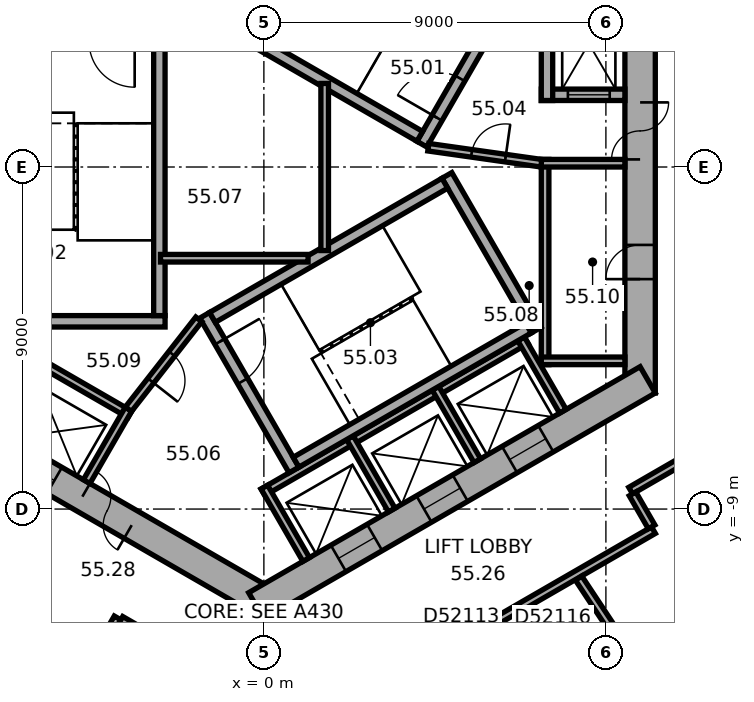
"""IFC4 building model, lengths in metres.
Left out: names, types, materials, properties, quantities, classifications, styles, units other than length and angle.
Written with IfcOpenShell. Run it as: python <this file> out.ifc"""

import sys

from ifc_helpers import new_model, si_unit, direction, frame, frame_2d, origin, place, context, subcontext, project, spatial, rectangle, extrude, element, fill, save


model = new_model("IFC4")
c1 = context("Model", 3, precision=1e-05, world=origin(), true_north=direction((0.0, 1.0)))
c2 = subcontext(c1, "Body", "Model", "MODEL_VIEW")
j1 = project(units=[si_unit("LENGTHUNIT", "METRE"), si_unit("PLANEANGLEUNIT", "RADIAN")], contexts=[c1])
p1 = place(None, origin())
s1 = spatial("IfcSite", under=j1, at=p1, CompositionType="ELEMENT")
p2 = place(p1, origin())
s2 = spatial("IfcBuilding", under=s1, at=p2, CompositionType="ELEMENT")
p3 = place(p2, frame((0.0, 0.0, 225.4)))
s3 = spatial("IfcBuildingStorey", under=s2, at=p3, CompositionType="ELEMENT", Elevation=225.4)
p4 = place(p3, frame((9.9, -5.947, 0.0), z_axis=(0.0, 0.0, 1.0), x_axis=(0.0, 1.0, 0.0)))
e1 = element("IfcWall", 1, at=p4, inside=s3, PredefinedType="SHEAR", context=c2, shape_type="SweptSolid", body=[
    extrude(rectangle(XDim=11.894, YDim=0.8, at=frame_2d((5.947, 0.0))), origin(), (0.0, 0.0, 1.0), 3.7),
])
p5 = place(p4, frame((6.147, 0.0, 0.0)))
e2 = element("IfcOpeningElement", 2, at=p5, cuts=e1, PredefinedType="OPENING", context=c2, shape_type="SweptSolid", body=[
    extrude(rectangle(XDim=1.5, YDim=2.1, at=frame_2d((0.75, 1.05))), frame((0.0, 0.41, 0.0), z_axis=(0.0, -1.0, 0.0), x_axis=(1.0, 0.0, 0.0)), (0.0, 0.0, 1.0), 0.82),
])
p6 = place(p4, frame((2.997, 0.0, 0.0)))
e3 = element("IfcOpeningElement", 3, at=p6, cuts=e1, PredefinedType="OPENING", context=c2, shape_type="SweptSolid", body=[
    extrude(rectangle(XDim=0.9, YDim=2.1, at=frame_2d((0.45, 1.05))), frame((0.0, 0.41, 0.0), z_axis=(0.0, -1.0, 0.0), x_axis=(1.0, 0.0, 0.0)), (0.0, 0.0, 1.0), 0.82),
])
p7 = place(p3, frame((-10.1, -5.6, 0.0), z_axis=(0.0, 0.0, 1.0), x_axis=(0.866023897231, -0.500002609418, 0.0)))
e4 = element("IfcWall", 4, at=p7, inside=s3, PredefinedType="SHEAR", context=c2, shape_type="SweptSolid", body=[
    extrude(rectangle(XDim=11.894, YDim=0.8, at=frame_2d((5.947, 0.0))), origin(), (0.0, 0.0, 1.0), 3.7),
])
p8 = place(p7, frame((6.147, 0.0, 0.0)))
e5 = element("IfcOpeningElement", 5, at=p8, cuts=e4, PredefinedType="OPENING", context=c2, shape_type="SweptSolid", body=[
    extrude(rectangle(XDim=1.5, YDim=2.1, at=frame_2d((0.75, 1.05))), frame((0.0, 0.41, 0.0), z_axis=(0.0, -1.0, 0.0), x_axis=(1.0, 0.0, 0.0)), (0.0, 0.0, 1.0), 0.82),
])
p9 = place(p7, frame((1.597, 0.0, 0.0)))
e6 = element("IfcOpeningElement", 6, at=p9, cuts=e4, PredefinedType="OPENING", context=c2, shape_type="SweptSolid", body=[
    extrude(rectangle(XDim=1.1, YDim=2.1, at=frame_2d((0.55, 1.05))), frame((0.0, 0.41, 0.0), z_axis=(0.0, -1.0, 0.0), x_axis=(1.0, 0.0, 0.0)), (0.0, 0.0, 1.0), 0.82),
])
p10 = place(p7, frame((4.197, 0.0, 0.0)))
e7 = element("IfcOpeningElement", 7, at=p10, cuts=e4, PredefinedType="OPENING", context=c2, shape_type="SweptSolid", body=[
    extrude(rectangle(XDim=1.1, YDim=2.1, at=frame_2d((0.55, 1.05))), frame((0.0, 0.41, 0.0), z_axis=(0.0, -1.0, 0.0), x_axis=(1.0, 0.0, 0.0)), (0.0, 0.0, 1.0), 0.82),
])
p11 = place(p3, frame((-0.2, -11.547, 0.0), z_axis=(0.0, 0.0, 1.0), x_axis=(0.866023897231, 0.500002609418, 0.0)))
e8 = element("IfcWall", 8, at=p11, inside=s3, PredefinedType="SHEAR", context=c2, shape_type="SweptSolid", body=[
    extrude(rectangle(XDim=11.894, YDim=0.8, at=frame_2d((5.947, 0.0))), origin(), (0.0, 0.0, 1.0), 3.7),
])
p12 = place(p11, frame((2.497, 0.0, 0.0)))
e9 = element("IfcOpeningElement", 9, at=p12, cuts=e8, PredefinedType="OPENING", context=c2, shape_type="SweptSolid", body=[
    extrude(rectangle(XDim=1.1, YDim=2.1, at=frame_2d((0.55, 1.05))), frame((0.0, 0.41, 0.0), z_axis=(0.0, -1.0, 0.0), x_axis=(1.0, 0.0, 0.0)), (0.0, 0.0, 1.0), 0.82),
])
p13 = place(p11, frame((5.097, 0.0, 0.0)))
e10 = element("IfcOpeningElement", 10, at=p13, cuts=e8, PredefinedType="OPENING", context=c2, shape_type="SweptSolid", body=[
    extrude(rectangle(XDim=1.1, YDim=2.1, at=frame_2d((0.55, 1.05))), frame((0.0, 0.41, 0.0), z_axis=(0.0, -1.0, 0.0), x_axis=(1.0, 0.0, 0.0)), (0.0, 0.0, 1.0), 0.82),
])
p14 = place(p11, frame((7.697, 0.0, 0.0)))
e11 = element("IfcOpeningElement", 11, at=p14, cuts=e8, PredefinedType="OPENING", context=c2, shape_type="SweptSolid", body=[
    extrude(rectangle(XDim=1.1, YDim=2.1, at=frame_2d((0.55, 1.05))), frame((0.0, 0.41, 0.0), z_axis=(0.0, -1.0, 0.0), x_axis=(1.0, 0.0, 0.0)), (0.0, 0.0, 1.0), 0.82),
])
p15 = place(p3, frame((7.4, -5.2, 0.0), z_axis=(0.0, 0.0, 1.0), x_axis=(0.0, 1.0, 0.0)))
e12 = element("IfcWall", 12, at=p15, inside=s3, PredefinedType="PARTITIONING", context=c2, shape_type="SweptSolid", body=[
    extrude(rectangle(XDim=5.4, YDim=0.2, at=frame_2d((2.7, 0.0))), origin(), (0.0, 0.0, 1.0), 3.42),
])
for number, where, z_axis, x_axis in (
    (13, (7.3, -5.1, 0.0), (0.0, 0.0, 1.0), (1.0, 0.0, 0.0)),
    (14, (7.3, 0.1, 0.0), (0.0, 0.0, 1.0), (1.0, 0.0, 0.0)),
):
    element("IfcWall", number, at=place(p3, frame(where, z_axis=z_axis, x_axis=x_axis)), inside=s3, PredefinedType="PARTITIONING", context=c2, shape_type="SweptSolid", body=[
        extrude(rectangle(XDim=2.2, YDim=0.2, at=frame_2d((1.1, 0.0))), origin(), (0.0, 0.0, 1.0), 3.42),
    ])
p16 = place(p3, frame((-8.203, -3.809, 0.0), z_axis=(0.0, 0.0, 1.0), x_axis=(0.866028230842, -0.499995103361, 0.0)))
e15 = element("IfcWall", 15, at=p16, inside=s3, PredefinedType="PARTITIONING", context=c2, shape_type="SweptSolid", body=[
    extrude(rectangle(XDim=5.4, YDim=0.2, at=frame_2d((2.7, 0.0))), origin(), (0.0, 0.0, 1.0), 3.42),
])
p17 = place(p3, frame((-3.563, -6.372, 0.0), z_axis=(0.0, 0.0, 1.0), x_axis=(-0.499994660107, -0.866028486751, 0.0)))
e16 = element("IfcWall", 16, at=p17, inside=s3, PredefinedType="PARTITIONING", context=c2, shape_type="SweptSolid", body=[
    extrude(rectangle(XDim=2.2, YDim=0.2, at=frame_2d((1.1, 0.0))), origin(), (0.0, 0.0, 1.0), 3.42),
])
p18 = place(p3, frame((-0.024, -8.559, 0.0), z_axis=(0.0, 0.0, 1.0), x_axis=(0.866026010844, 0.49999894854, 0.0)))
e17 = element("IfcWall", 17, at=p18, inside=s3, PredefinedType="PARTITIONING", context=c2, shape_type="SweptSolid", body=[
    extrude(rectangle(XDim=8.0, YDim=0.2, at=frame_2d((4.0, 0.0))), origin(), (0.0, 0.0, 1.0), 3.42),
])
for number, where, z_axis, x_axis in (
    (18, (0.013, -8.422, 0.0), (0.0, 0.0, 1.0), (0.5, -0.866, 0.0)),
    (19, (2.264, -7.122, 0.0), (0.0, 0.0, 1.0), (0.5, -0.866, 0.0)),
    (20, (4.516, -5.822, 0.0), (0.0, 0.0, 1.0), (0.5, -0.866, 0.0)),
    (21, (6.768, -4.522, 0.0), (0.0, 0.0, 1.0), (0.5, -0.866, 0.0)),
):
    element("IfcWall", number, at=place(p3, frame(where, z_axis=z_axis, x_axis=x_axis)), inside=s3, PredefinedType="PARTITIONING", context=c2, shape_type="SweptSolid", body=[
        extrude(rectangle(XDim=2.2, YDim=0.2, at=frame_2d((1.1, 0.0))), origin(), (0.0, 0.0, 1.0), 3.42),
    ])
p19 = place(p3, frame((4.158, 0.602, 0.0), z_axis=(0.0, 0.0, 1.0), x_axis=(0.499977259774, 0.866038532462, 0.0)))
e22 = element("IfcWall", 22, at=p19, inside=s3, PredefinedType="SHEAR", context=c2, shape_type="SweptSolid", body=[
    extrude(rectangle(XDim=4.7, YDim=0.3, at=frame_2d((2.35, 0.0))), origin(), (0.0, 0.0, 1.0), 3.42),
])
p20 = place(p19, frame((0.8, 0.0, 0.0)))
e23 = element("IfcOpeningElement", 23, at=p20, cuts=e22, PredefinedType="OPENING", context=c2, shape_type="SweptSolid", body=[
    extrude(rectangle(XDim=1.2, YDim=2.1, at=frame_2d((0.6, 1.05))), frame((0.0, 0.16, 0.0), z_axis=(0.0, -1.0, 0.0), x_axis=(1.0, 0.0, 0.0)), (0.0, 0.0, 1.0), 0.32),
])
p21 = place(p3, frame((4.103, 0.807, 0.0), z_axis=(0.0, 0.0, 1.0), x_axis=(-0.866027801685, 0.499995846692, 0.0)))
e24 = element("IfcWall", 24, at=p21, inside=s3, PredefinedType="SHEAR", context=c2, shape_type="SweptSolid", body=[
    extrude(rectangle(XDim=7.06, YDim=0.3, at=frame_2d((3.53, 0.0))), origin(), (0.0, 0.0, 1.0), 3.42),
])
p22 = place(p3, frame((-2.6, -4.06, 0.0), z_axis=(0.0, 0.0, 1.0), x_axis=(-1.0, 0.0, 0.0)))
e25 = element("IfcWall", 25, at=p22, inside=s3, PredefinedType="SHEAR", context=c2, shape_type="SweptSolid", body=[
    extrude(rectangle(XDim=4.7, YDim=0.3, at=frame_2d((2.35, 0.0))), origin(), (0.0, 0.0, 1.0), 3.42),
])
p23 = place(p3, frame((-2.75, 3.15, 0.0), z_axis=(0.0, 0.0, 1.0), x_axis=(0.0, -1.0, 0.0)))
e26 = element("IfcWall", 26, at=p23, inside=s3, PredefinedType="SHEAR", context=c2, shape_type="SweptSolid", body=[
    extrude(rectangle(XDim=7.06, YDim=0.3, at=frame_2d((3.53, 0.0))), origin(), (0.0, 0.0, 1.0), 3.42),
])
p24 = place(p3, frame((-1.558, -3.902, 0.0), z_axis=(0.0, 0.0, 1.0), x_axis=(0.499977259774, -0.866038532462, 0.0)))
e27 = element("IfcWall", 27, at=p24, inside=s3, PredefinedType="SHEAR", context=c2, shape_type="SweptSolid", body=[
    extrude(rectangle(XDim=4.7, YDim=0.3, at=frame_2d((2.35, 0.0))), origin(), (0.0, 0.0, 1.0), 3.42),
])
p25 = place(p24, frame((0.8, 0.0, 0.0)))
e28 = element("IfcOpeningElement", 28, at=p25, cuts=e27, PredefinedType="OPENING", context=c2, shape_type="SweptSolid", body=[
    extrude(rectangle(XDim=1.2, YDim=2.1, at=frame_2d((0.6, 1.05))), frame((0.0, 0.16, 0.0), z_axis=(0.0, -1.0, 0.0), x_axis=(1.0, 0.0, 0.0)), (0.0, 0.0, 1.0), 0.32),
])
p26 = place(p3, frame((4.816, -0.222, 0.0), z_axis=(0.0, 0.0, 1.0), x_axis=(0.499977259774, -0.866038532462, 0.0)))
e29 = element("IfcWall", 29, at=p26, inside=s3, PredefinedType="SHEAR", context=c2, shape_type="SweptSolid", body=[
    extrude(rectangle(XDim=4.7, YDim=0.3, at=frame_2d((2.35, 0.0))), origin(), (0.0, 0.0, 1.0), 3.42),
])
for number, where, z_axis, x_axis in (
    (30, (-1.353, -3.957, 0.0), (0.0, 0.0, 1.0), (0.866, 0.5, 0.0)),
    (31, (0.847, -7.767, 0.0), (0.0, 0.0, 1.0), (0.866, 0.5, 0.0)),
):
    element("IfcWall", number, at=place(p3, frame(where, z_axis=z_axis, x_axis=x_axis)), inside=s3, PredefinedType="SHEAR", context=c2, shape_type="SweptSolid", body=[
        extrude(rectangle(XDim=7.06, YDim=0.3, at=frame_2d((3.53, 0.0))), origin(), (0.0, 0.0, 1.0), 3.42),
    ])
p27 = place(p3, frame((7.3, 1.9, 0.0), z_axis=(0.0, 0.0, 1.0), x_axis=(1.0, 0.0, 0.0)))
e32 = element("IfcWall", 32, at=p27, inside=s3, PredefinedType="SHEAR", context=c2, shape_type="SweptSolid", body=[
    extrude(rectangle(XDim=2.2, YDim=0.3, at=frame_2d((1.1, 0.0))), origin(), (0.0, 0.0, 1.0), 3.42),
])
p28 = place(p27, frame((0.7, 0.0, 0.0)))
e33 = element("IfcOpeningElement", 33, at=p28, cuts=e32, PredefinedType="OPENING", context=c2, shape_type="SweptSolid", body=[
    extrude(rectangle(XDim=1.1, YDim=2.1, at=frame_2d((0.55, 1.05))), frame((0.0, 0.16, 0.0), z_axis=(0.0, -1.0, 0.0), x_axis=(1.0, 0.0, 0.0)), (0.0, 0.0, 1.0), 0.32),
])
p29 = place(p3, frame((7.45, 1.75, 0.0), z_axis=(0.0, 0.0, 1.0), x_axis=(0.0, 1.0, 0.0)))
e34 = element("IfcWall", 34, at=p29, inside=s3, PredefinedType="SHEAR", context=c2, shape_type="SweptSolid", body=[
    extrude(rectangle(XDim=3.35, YDim=0.3, at=frame_2d((1.675, 0.0))), origin(), (0.0, 0.0, 1.0), 3.42),
])
p30 = place(p3, frame((4.327, 0.521, 0.0), z_axis=(0.0, 0.0, 1.0), x_axis=(0.990124376366, -0.14019172346, 0.0)))
e35 = element("IfcWall", 35, at=p30, inside=s3, PredefinedType="PARTITIONING", context=c2, shape_type="SweptSolid", body=[
    extrude(rectangle(XDim=3.002, YDim=0.2, at=frame_2d((1.501, 0.0))), origin(), (0.0, 0.0, 1.0), 3.42),
])
p31 = place(p30, frame((1.15, 0.0, 0.0)))
e36 = element("IfcOpeningElement", 36, at=p31, cuts=e35, PredefinedType="OPENING", context=c2, shape_type="SweptSolid", body=[
    extrude(rectangle(XDim=0.9, YDim=2.1, at=frame_2d((0.45, 1.05))), frame((0.0, 0.11, 0.0), z_axis=(0.0, -1.0, 0.0), x_axis=(1.0, 0.0, 0.0)), (0.0, 0.0, 1.0), 0.22),
])
p32 = place(p3, frame((-1.712, -4.008, 0.0), z_axis=(0.0, 0.0, 1.0), x_axis=(-0.616549420702, -0.787316208287, 0.0)))
e37 = element("IfcWall", 37, at=p32, inside=s3, PredefinedType="PARTITIONING", context=c2, shape_type="SweptSolid", body=[
    extrude(rectangle(XDim=3.002, YDim=0.2, at=frame_2d((1.501, 0.0))), origin(), (0.0, 0.0, 1.0), 3.42),
])
p33 = place(p32, frame((1.15, 0.0, 0.0)))
e38 = element("IfcOpeningElement", 38, at=p33, cuts=e37, PredefinedType="OPENING", context=c2, shape_type="SweptSolid", body=[
    extrude(rectangle(XDim=0.9, YDim=2.1, at=frame_2d((0.45, 1.05))), frame((0.0, 0.11, 0.0), z_axis=(0.0, -1.0, 0.0), x_axis=(1.0, 0.0, 0.0)), (0.0, 0.0, 1.0), 0.22),
])
p34 = place(p3, frame((-2.72, -2.4, 0.0), z_axis=(0.0, 0.0, 1.0), x_axis=(1.0, 0.0, 0.0)))
e39 = element("IfcWall", 39, at=p34, inside=s3, PredefinedType="PARTITIONING", context=c2, shape_type="SweptSolid", body=[
    extrude(rectangle(XDim=3.883, YDim=0.2, at=frame_2d((1.941, 0.0))), origin(), (0.0, 0.0, 1.0), 3.42),
])
p35 = place(p3, frame((1.6, -2.198, 0.0), z_axis=(0.0, 0.0, 1.0), x_axis=(0.0, 1.0, 0.0)))
e40 = element("IfcWall", 40, at=p35, inside=s3, PredefinedType="PARTITIONING", context=c2, shape_type="SweptSolid", body=[
    extrude(rectangle(XDim=4.397, YDim=0.2, at=frame_2d((2.198, 0.0))), origin(), (0.0, 0.0, 1.0), 3.42),
])
p36 = place(p3, frame((-7.525, -18.23, 0.0), z_axis=(0.0, 0.0, 1.0), x_axis=(0.499983153418, 0.866035129944, 0.0)))
e41 = element("IfcWall", 41, at=p36, inside=s3, PredefinedType="PARTITIONING", context=c2, shape_type="SweptSolid", body=[
    extrude(rectangle(XDim=7.35, YDim=0.2, at=frame_2d((3.675, 0.0))), origin(), (0.0, 0.0, 1.0), 3.42),
])
p37 = place(p36, frame((3.175, 0.0, 0.0)))
e42 = element("IfcOpeningElement", 42, at=p37, cuts=e41, PredefinedType="OPENING", context=c2, shape_type="SweptSolid", body=[
    extrude(rectangle(XDim=1.0, YDim=2.1, at=frame_2d((0.5, 1.05))), frame((0.0, 0.11, 0.0), z_axis=(0.0, -1.0, 0.0), x_axis=(1.0, 0.0, 0.0)), (0.0, 0.0, 1.0), 0.22),
])
p38 = place(p3, frame((-3.763, -11.915, 0.0), z_axis=(0.0, 0.0, 1.0), x_axis=(0.866037915695, -0.499978328108, 0.0)))
e43 = element("IfcWall", 43, at=p38, inside=s3, PredefinedType="PARTITIONING", context=c2, shape_type="SweptSolid", body=[
    extrude(rectangle(XDim=3.249, YDim=0.2, at=frame_2d((1.625, 0.0))), origin(), (0.0, 0.0, 1.0), 3.42),
])
p39 = place(p3, frame((2.716, -13.906, 0.0), z_axis=(0.0, 0.0, 1.0), x_axis=(0.866040290674, 0.499974214264, 0.0)))
e44 = element("IfcWall", 44, at=p39, inside=s3, PredefinedType="PARTITIONING", context=c2, shape_type="SweptSolid", body=[
    extrude(rectangle(XDim=8.702, YDim=0.2, at=frame_2d((4.351, 0.0))), origin(), (0.0, 0.0, 1.0), 3.42),
])
p40 = place(p39, frame((2.679, 0.0, 0.0)))
e45 = element("IfcOpeningElement", 45, at=p40, cuts=e44, PredefinedType="OPENING", context=c2, shape_type="SweptSolid", body=[
    extrude(rectangle(XDim=1.0, YDim=2.1, at=frame_2d((0.5, 1.05))), frame((0.0, 0.11, 0.0), z_axis=(0.0, -1.0, 0.0), x_axis=(1.0, 0.0, 0.0)), (0.0, 0.0, 1.0), 0.22),
])
p41 = place(p3, frame((9.652, -8.515, 0.0), z_axis=(0.0, 0.0, 1.0), x_axis=(0.866020375458, 0.500008709215, 0.0)))
e46 = element("IfcWall", 46, at=p41, inside=s3, PredefinedType="PARTITIONING", context=c2, shape_type="SweptSolid", body=[
    extrude(rectangle(XDim=1.846, YDim=0.2, at=frame_2d((0.923, 0.0))), origin(), (0.0, 0.0, 1.0), 3.42),
])
p42 = place(p3, frame((10.202, -9.469, 0.0), z_axis=(0.0, 0.0, 1.0), x_axis=(-0.499968756647, 0.866043441391, 0.0)))
e47 = element("IfcWall", 47, at=p42, inside=s3, PredefinedType="PARTITIONING", context=c2, shape_type="SweptSolid", body=[
    extrude(rectangle(XDim=1.001, YDim=0.2, at=frame_2d((0.5, 0.0))), origin(), (0.0, 0.0, 1.0), 3.42),
])
p43 = place(p3, frame((11.571, -15.786, 0.0), z_axis=(0.0, 0.0, 1.0), x_axis=(-0.551944861763, 0.833880608705, 0.0)))
e48 = element("IfcWall", 48, at=p43, inside=s3, PredefinedType="PARTITIONING", context=c2, shape_type="SweptSolid", body=[
    extrude(rectangle(XDim=5.957, YDim=0.2, at=frame_2d((2.979, 0.0))), origin(), (0.0, 0.0, 1.0), 3.42),
])
p44 = place(p5, origin())
e49 = element("IfcDoor", 49, at=p44, inside=s3, OperationType="DOUBLE_DOOR_SINGLE_SWING", PredefinedType="DOOR", context=c2, shape_type="SweptSolid", body=[
    extrude(rectangle(XDim=1.5, YDim=2.1, at=frame_2d((0.75, 1.05))), frame((0.0, 0.025, 0.0), z_axis=(0.0, -1.0, 0.0), x_axis=(1.0, 0.0, 0.0)), (0.0, 0.0, 1.0), 0.05),
])
fill(e2, e49)
p45 = place(p8, origin())
e50 = element("IfcDoor", 50, at=p45, inside=s3, OperationType="DOUBLE_DOOR_SINGLE_SWING", PredefinedType="DOOR", context=c2, shape_type="SweptSolid", body=[
    extrude(rectangle(XDim=1.5, YDim=2.1, at=frame_2d((0.75, 1.05))), frame((0.0, 0.025, 0.0), z_axis=(0.0, -1.0, 0.0), x_axis=(1.0, 0.0, 0.0)), (0.0, 0.0, 1.0), 0.05),
])
fill(e5, e50)
p46 = place(p20, origin())
e51 = element("IfcDoor", 51, at=p46, inside=s3, OperationType="SINGLE_SWING_RIGHT", PredefinedType="DOOR", context=c2, shape_type="SweptSolid", body=[
    extrude(rectangle(XDim=1.2, YDim=2.1, at=frame_2d((0.6, 1.05))), frame((0.0, 0.025, 0.0), z_axis=(0.0, -1.0, 0.0), x_axis=(1.0, 0.0, 0.0)), (0.0, 0.0, 1.0), 0.05),
])
fill(e23, e51)
p47 = place(p25, origin())
e52 = element("IfcDoor", 52, at=p47, inside=s3, OperationType="SINGLE_SWING_RIGHT", PredefinedType="DOOR", context=c2, shape_type="SweptSolid", body=[
    extrude(rectangle(XDim=1.2, YDim=2.1, at=frame_2d((0.6, 1.05))), frame((0.0, 0.025, 0.0), z_axis=(0.0, -1.0, 0.0), x_axis=(1.0, 0.0, 0.0)), (0.0, 0.0, 1.0), 0.05),
])
fill(e28, e52)
p48 = place(p31, origin())
e53 = element("IfcDoor", 53, at=p48, inside=s3, OperationType="SINGLE_SWING_LEFT", PredefinedType="DOOR", context=c2, shape_type="SweptSolid", body=[
    extrude(rectangle(XDim=0.9, YDim=2.1, at=frame_2d((0.45, 1.05))), frame((0.0, 0.025, 0.0), z_axis=(0.0, -1.0, 0.0), x_axis=(1.0, 0.0, 0.0)), (0.0, 0.0, 1.0), 0.05),
])
fill(e36, e53)
p49 = place(p33, origin())
e54 = element("IfcDoor", 54, at=p49, inside=s3, OperationType="SINGLE_SWING_LEFT", PredefinedType="DOOR", context=c2, shape_type="SweptSolid", body=[
    extrude(rectangle(XDim=0.9, YDim=2.1, at=frame_2d((0.45, 1.05))), frame((0.0, 0.025, 0.0), z_axis=(0.0, -1.0, 0.0), x_axis=(1.0, 0.0, 0.0)), (0.0, 0.0, 1.0), 0.05),
])
fill(e38, e54)
p50 = place(p6, origin())
e55 = element("IfcDoor", 55, at=p50, inside=s3, OperationType="SINGLE_SWING_LEFT", PredefinedType="DOOR", context=c2, shape_type="SweptSolid", body=[
    extrude(rectangle(XDim=0.9, YDim=2.1, at=frame_2d((0.45, 1.05))), frame((0.0, 0.025, 0.0), z_axis=(0.0, -1.0, 0.0), x_axis=(1.0, 0.0, 0.0)), (0.0, 0.0, 1.0), 0.05),
])
fill(e3, e55)
p51 = place(p28, origin())
e56 = element("IfcDoor", 56, at=p51, inside=s3, OperationType="DOUBLE_DOOR_SLIDING", PredefinedType="DOOR", context=c2, shape_type="SweptSolid", body=[
    extrude(rectangle(XDim=1.1, YDim=2.1, at=frame_2d((0.55, 1.05))), frame((0.0, 0.025, 0.0), z_axis=(0.0, -1.0, 0.0), x_axis=(1.0, 0.0, 0.0)), (0.0, 0.0, 1.0), 0.05),
])
fill(e33, e56)
p52 = place(p10, origin())
e57 = element("IfcDoor", 57, at=p52, inside=s3, OperationType="DOUBLE_DOOR_SLIDING", PredefinedType="DOOR", context=c2, shape_type="SweptSolid", body=[
    extrude(rectangle(XDim=1.1, YDim=2.1, at=frame_2d((0.55, 1.05))), frame((0.0, 0.025, 0.0), z_axis=(0.0, -1.0, 0.0), x_axis=(1.0, 0.0, 0.0)), (0.0, 0.0, 1.0), 0.05),
])
fill(e7, e57)
p53 = place(p12, origin())
e58 = element("IfcDoor", 58, at=p53, inside=s3, OperationType="DOUBLE_DOOR_SLIDING", PredefinedType="DOOR", context=c2, shape_type="SweptSolid", body=[
    extrude(rectangle(XDim=1.1, YDim=2.1, at=frame_2d((0.55, 1.05))), frame((0.0, 0.025, 0.0), z_axis=(0.0, -1.0, 0.0), x_axis=(1.0, 0.0, 0.0)), (0.0, 0.0, 1.0), 0.05),
])
fill(e9, e58)
p54 = place(p13, origin())
e59 = element("IfcDoor", 59, at=p54, inside=s3, OperationType="DOUBLE_DOOR_SLIDING", PredefinedType="DOOR", context=c2, shape_type="SweptSolid", body=[
    extrude(rectangle(XDim=1.1, YDim=2.1, at=frame_2d((0.55, 1.05))), frame((0.0, 0.025, 0.0), z_axis=(0.0, -1.0, 0.0), x_axis=(1.0, 0.0, 0.0)), (0.0, 0.0, 1.0), 0.05),
])
fill(e10, e59)
p55 = place(p14, origin())
e60 = element("IfcDoor", 60, at=p55, inside=s3, OperationType="DOUBLE_DOOR_SLIDING", PredefinedType="DOOR", context=c2, shape_type="SweptSolid", body=[
    extrude(rectangle(XDim=1.1, YDim=2.1, at=frame_2d((0.55, 1.05))), frame((0.0, 0.025, 0.0), z_axis=(0.0, -1.0, 0.0), x_axis=(1.0, 0.0, 0.0)), (0.0, 0.0, 1.0), 0.05),
])
fill(e11, e60)
save(model, sys.argv[1])
